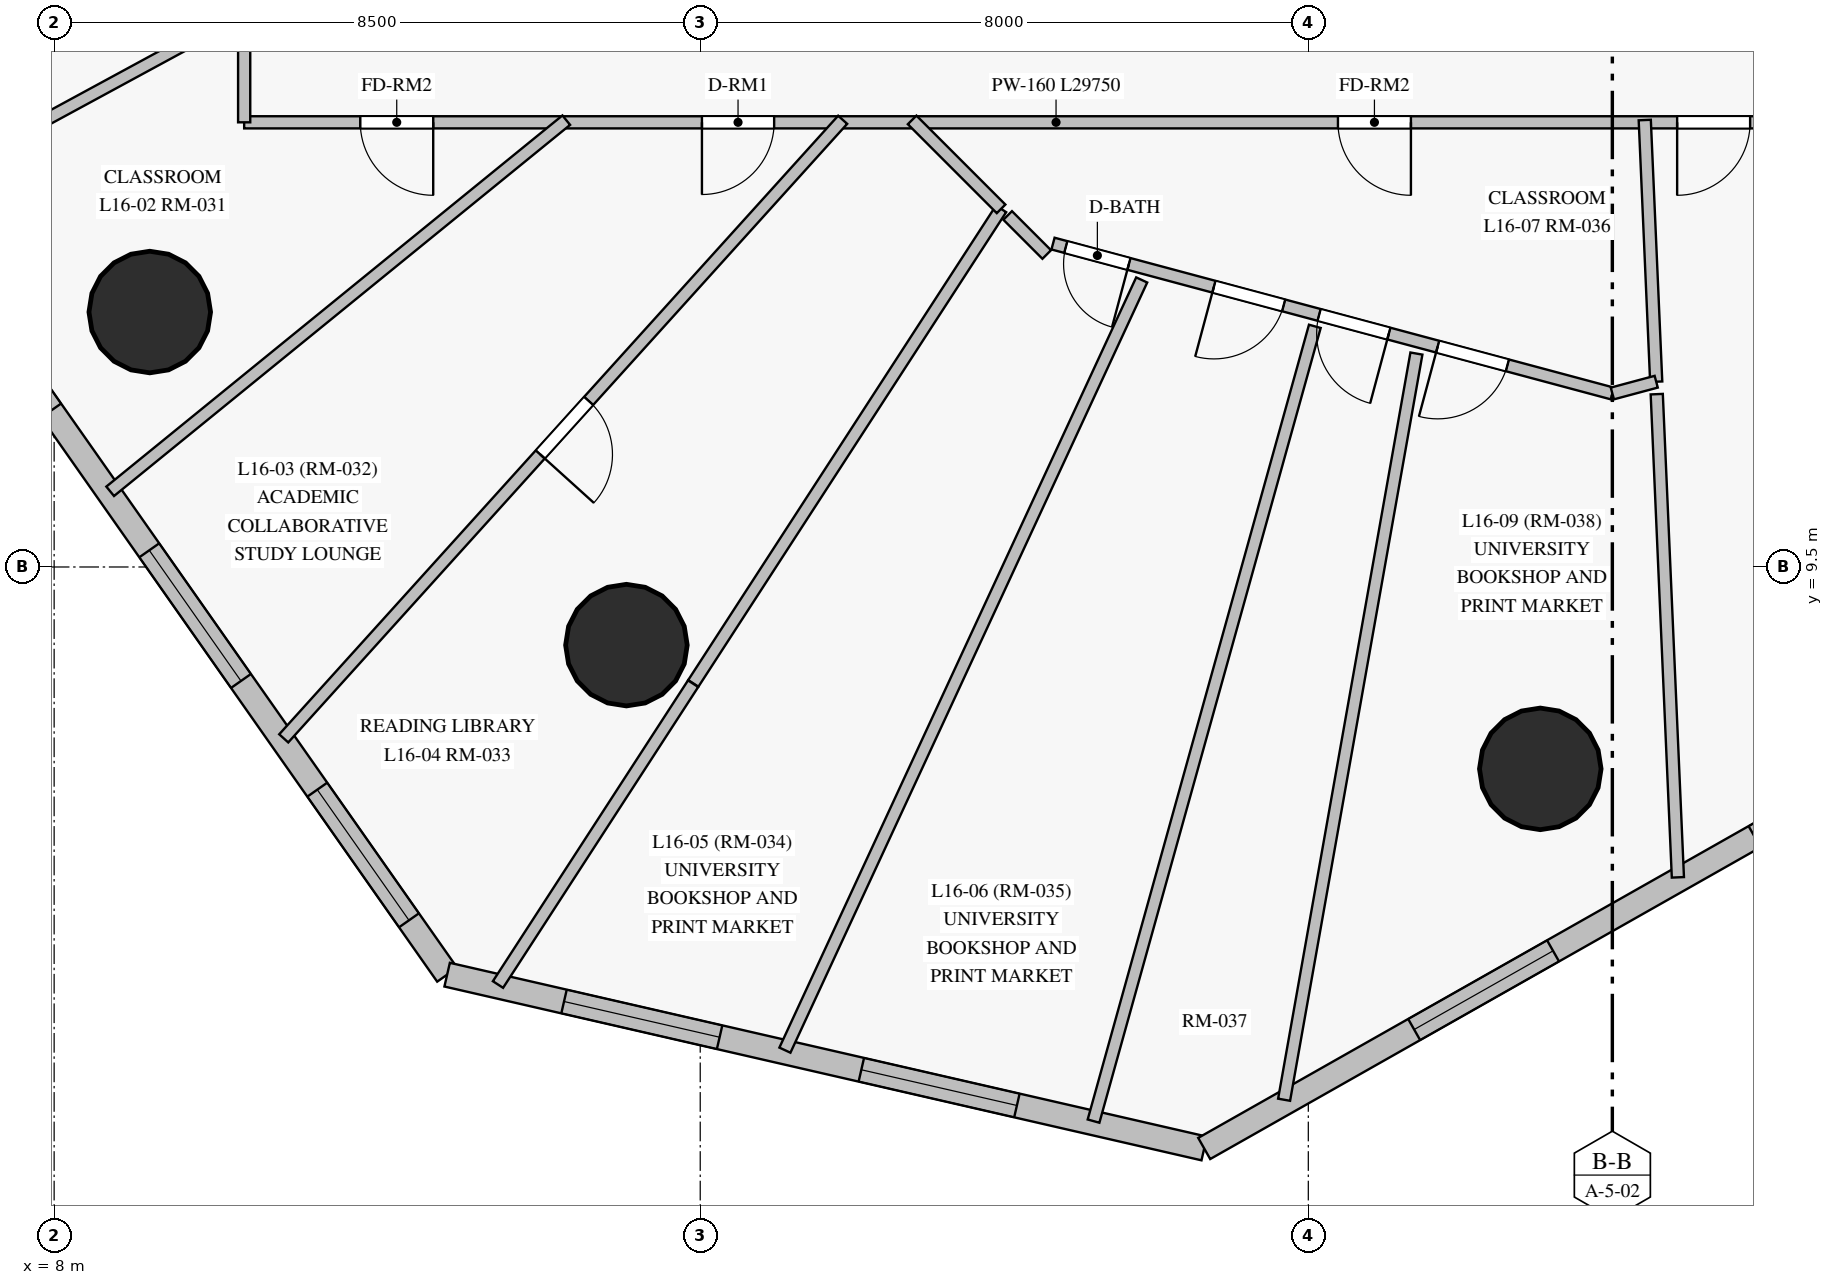
"""IFC4 building model, lengths in metres.
Left out: names, types, materials, properties, quantities, classifications, styles, units other than length and angle.
Written with IfcOpenShell. Run it as: python <this file> out.ifc"""

import sys

from ifc_helpers import new_model, si_unit, direction, frame, frame_2d, origin, origin_with_axes, origin_2d, place, context, subcontext, project, spatial, rectangle, circle, extrude, source, transform, mapped, element, fill, save


model = new_model("IFC4")
c1 = context("Model", 3, precision=1e-05, world=origin(), true_north=direction((0.0, 1.0)))
c2 = subcontext(c1, "Body", "Model", "MODEL_VIEW")
j1 = project(units=[si_unit("LENGTHUNIT", "METRE"), si_unit("PLANEANGLEUNIT", "RADIAN")], contexts=[c1])
p1 = place(None, origin())
s1 = spatial("IfcSite", under=j1, at=p1, CompositionType="ELEMENT")
p2 = place(p1, origin())
s2 = spatial("IfcBuilding", under=s1, at=p2, CompositionType="ELEMENT")
p3 = place(p2, frame((0.0, 0.0, 62.5)))
s3 = spatial("IfcBuildingStorey", under=s2, at=p3, CompositionType="ELEMENT", Elevation=62.5)
m1 = source(origin_with_axes(), c2, "Body", "SweptSolid", [
    extrude(circle(Radius=0.8, at=origin_2d()), origin(), (0.0, 0.0, 1.0), 3.6),
])
for number, where, z_axis, x_axis in (
    (1, (9.258, 12.854, 0.0), (0.0, 0.0, 1.0), (1.0, 0.0, 0.0)),
    (2, (15.529, 8.472, 0.0), (0.0, 0.0, 1.0), (1.0, 0.0, 0.0)),
    (3, (27.552, 6.844, 0.0), (0.0, 0.0, 1.0), (1.0, 0.0, 0.0)),
):
    element("IfcColumn", number, at=place(p3, frame(where, z_axis=z_axis, x_axis=x_axis)), inside=s3, PredefinedType="COLUMN", context=c2, shape_type="MappedRepresentation", body=[
        mapped(m1, transform((0.0, 0.0, 0.0), scale=1.0)),
    ])
p4 = place(p3, frame((5.857, 14.555, 0.0), z_axis=(0.0, 0.0, 1.0), x_axis=(0.574536666847, -0.818478844228, 0.0)))
e4 = element("IfcWall", 4, at=p4, inside=s3, PredefinedType="SOLIDWALL", context=c2, shape_type="SweptSolid", body=[
    extrude(rectangle(XDim=12.729, YDim=0.32, at=frame_2d((6.365, 0.0))), origin(), (0.0, 0.0, 1.0), 3.35),
])
p5 = place(p4, frame((1.562, 0.0, 0.85)))
e5 = element("IfcOpeningElement", 5, at=p5, cuts=e4, PredefinedType="OPENING", context=c2, shape_type="SweptSolid", body=[
    extrude(rectangle(XDim=2.1, YDim=1.95, at=frame_2d((1.05, 0.975))), frame((0.0, 0.17, 0.0), z_axis=(0.0, -1.0, 0.0), x_axis=(1.0, 0.0, 0.0)), (0.0, 0.0, 1.0), 0.34),
])
p6 = place(p4, frame((5.908, 0.0, 0.85)))
e6 = element("IfcOpeningElement", 6, at=p6, cuts=e4, PredefinedType="OPENING", context=c2, shape_type="SweptSolid", body=[
    extrude(rectangle(XDim=2.1, YDim=1.95, at=frame_2d((1.05, 0.975))), frame((0.0, 0.17, 0.0), z_axis=(0.0, -1.0, 0.0), x_axis=(1.0, 0.0, 0.0)), (0.0, 0.0, 1.0), 0.34),
])
p7 = place(p4, frame((9.756, 0.0, 0.85)))
e7 = element("IfcOpeningElement", 7, at=p7, cuts=e4, PredefinedType="OPENING", context=c2, shape_type="SweptSolid", body=[
    extrude(rectangle(XDim=2.1, YDim=1.95, at=frame_2d((1.05, 0.975))), frame((0.0, 0.17, 0.0), z_axis=(0.0, -1.0, 0.0), x_axis=(1.0, 0.0, 0.0)), (0.0, 0.0, 1.0), 0.34),
])
p8 = place(p3, frame((13.17, 4.137, 0.0), z_axis=(0.0, 0.0, 1.0), x_axis=(0.974645442503, -0.223754913707, 0.0)))
e8 = element("IfcWall", 8, at=p8, inside=s3, PredefinedType="SOLIDWALL", context=c2, shape_type="SweptSolid", body=[
    extrude(rectangle(XDim=10.219, YDim=0.32, at=frame_2d((5.11, 0.0))), origin(), (0.0, 0.0, 1.0), 3.35),
])
p9 = place(p8, frame((1.578, 0.0, 0.85)))
e9 = element("IfcOpeningElement", 9, at=p9, cuts=e8, PredefinedType="OPENING", context=c2, shape_type="SweptSolid", body=[
    extrude(rectangle(XDim=2.1, YDim=1.95, at=frame_2d((1.05, 0.975))), frame((0.0, 0.17, 0.0), z_axis=(0.0, -1.0, 0.0), x_axis=(1.0, 0.0, 0.0)), (0.0, 0.0, 1.0), 0.34),
])
p10 = place(p8, frame((5.591, 0.0, 0.85)))
e10 = element("IfcOpeningElement", 10, at=p10, cuts=e8, PredefinedType="OPENING", context=c2, shape_type="SweptSolid", body=[
    extrude(rectangle(XDim=2.1, YDim=1.95, at=frame_2d((1.05, 0.975))), frame((0.0, 0.17, 0.0), z_axis=(0.0, -1.0, 0.0), x_axis=(1.0, 0.0, 0.0)), (0.0, 0.0, 1.0), 0.34),
])
p11 = place(p3, frame((23.131, 1.85, 0.0), z_axis=(0.0, 0.0, 1.0), x_axis=(0.870097602534, 0.492879459974, 0.0)))
e11 = element("IfcWall", 11, at=p11, inside=s3, PredefinedType="SOLIDWALL", context=c2, shape_type="SweptSolid", body=[
    extrude(rectangle(XDim=15.318, YDim=0.32, at=frame_2d((7.659, 0.0))), origin(), (0.0, 0.0, 1.0), 3.35),
])
p12 = place(p11, frame((3.175, 0.0, 0.85)))
e12 = element("IfcOpeningElement", 12, at=p12, cuts=e11, PredefinedType="OPENING", context=c2, shape_type="SweptSolid", body=[
    extrude(rectangle(XDim=2.1, YDim=1.95, at=frame_2d((1.05, 0.975))), frame((0.0, 0.17, 0.0), z_axis=(0.0, -1.0, 0.0), x_axis=(1.0, 0.0, 0.0)), (0.0, 0.0, 1.0), 0.34),
])
p13 = place(p11, frame((8.322, 0.0, 0.85)))
e13 = element("IfcOpeningElement", 13, at=p13, cuts=e11, PredefinedType="OPENING", context=c2, shape_type="SweptSolid", body=[
    extrude(rectangle(XDim=2.1, YDim=1.95, at=frame_2d((1.05, 0.975))), frame((0.0, 0.17, 0.0), z_axis=(0.0, -1.0, 0.0), x_axis=(1.0, 0.0, 0.0)), (0.0, 0.0, 1.0), 0.34),
])
p14 = place(p11, frame((12.033, 0.0, 0.85)))
e14 = element("IfcOpeningElement", 14, at=p14, cuts=e11, PredefinedType="OPENING", context=c2, shape_type="SweptSolid", body=[
    extrude(rectangle(XDim=2.1, YDim=1.95, at=frame_2d((1.05, 0.975))), frame((0.0, 0.17, 0.0), z_axis=(0.0, -1.0, 0.0), x_axis=(1.0, 0.0, 0.0)), (0.0, 0.0, 1.0), 0.34),
])
p15 = place(p3, frame((40.25, 15.35, 0.0), z_axis=(0.0, 0.0, 1.0), x_axis=(-1.0, 0.0, 0.0)))
e15 = element("IfcWall", 15, at=p15, inside=s3, PredefinedType="PARTITIONING", context=c2, shape_type="SweptSolid", body=[
    extrude(rectangle(XDim=29.75, YDim=0.16, at=frame_2d((14.875, 0.0))), origin(), (0.0, 0.0, 1.0), 2.7),
])
p16 = place(p15, frame((27.263, 0.0, 0.0)))
e16 = element("IfcOpeningElement", 16, at=p16, cuts=e15, PredefinedType="OPENING", context=c2, shape_type="SweptSolid", body=[
    extrude(rectangle(XDim=0.96, YDim=2.15, at=frame_2d((0.48, 1.075))), frame((0.0, 0.09, 0.0), z_axis=(0.0, -1.0, 0.0), x_axis=(1.0, 0.0, 0.0)), (0.0, 0.0, 1.0), 0.18),
])
p17 = place(p15, frame((22.778, 0.0, 0.0)))
e17 = element("IfcOpeningElement", 17, at=p17, cuts=e15, PredefinedType="OPENING", context=c2, shape_type="SweptSolid", body=[
    extrude(rectangle(XDim=0.95, YDim=2.15, at=frame_2d((0.475, 1.075))), frame((0.0, 0.09, 0.0), z_axis=(0.0, -1.0, 0.0), x_axis=(1.0, 0.0, 0.0)), (0.0, 0.0, 1.0), 0.18),
])
p18 = place(p15, frame((14.4, 0.0, 0.0)))
e18 = element("IfcOpeningElement", 18, at=p18, cuts=e15, PredefinedType="OPENING", context=c2, shape_type="SweptSolid", body=[
    extrude(rectangle(XDim=0.96, YDim=2.15, at=frame_2d((0.48, 1.075))), frame((0.0, 0.09, 0.0), z_axis=(0.0, -1.0, 0.0), x_axis=(1.0, 0.0, 0.0)), (0.0, 0.0, 1.0), 0.18),
])
p19 = place(p15, frame((9.938, 0.0, 0.0)))
e19 = element("IfcOpeningElement", 19, at=p19, cuts=e15, PredefinedType="OPENING", context=c2, shape_type="SweptSolid", body=[
    extrude(rectangle(XDim=0.96, YDim=2.15, at=frame_2d((0.48, 1.075))), frame((0.0, 0.09, 0.0), z_axis=(0.0, -1.0, 0.0), x_axis=(1.0, 0.0, 0.0)), (0.0, 0.0, 1.0), 0.18),
])
p20 = place(p15, frame((2.033, 0.0, 0.0)))
e20 = element("IfcOpeningElement", 20, at=p20, cuts=e15, PredefinedType="OPENING", context=c2, shape_type="SweptSolid", body=[
    extrude(rectangle(XDim=0.95, YDim=2.15, at=frame_2d((0.475, 1.075))), frame((0.0, 0.09, 0.0), z_axis=(0.0, -1.0, 0.0), x_axis=(1.0, 0.0, 0.0)), (0.0, 0.0, 1.0), 0.18),
])
p21 = place(p3, frame((10.5, 15.35, 0.0), z_axis=(0.0, 0.0, 1.0), x_axis=(0.0, 1.0, 0.0)))
e21 = element("IfcWall", 21, at=p21, inside=s3, PredefinedType="PARTITIONING", context=c2, shape_type="SweptSolid", body=[
    extrude(rectangle(XDim=22.3, YDim=0.16, at=frame_2d((11.15, 0.0))), origin(), (0.0, 0.0, 1.0), 2.75),
])
p22 = place(p21, frame((5.1, 0.0, 0.0)))
e22 = element("IfcOpeningElement", 22, at=p22, cuts=e21, PredefinedType="OPENING", context=c2, shape_type="SweptSolid", body=[
    extrude(rectangle(XDim=0.95, YDim=2.15, at=frame_2d((0.475, 1.075))), frame((0.0, 0.09, 0.0), z_axis=(0.0, -1.0, 0.0), x_axis=(1.0, 0.0, 0.0)), (0.0, 0.0, 1.0), 0.18),
])
p23 = place(p21, frame((10.675, 0.0, 0.0)))
e23 = element("IfcOpeningElement", 23, at=p23, cuts=e21, PredefinedType="OPENING", context=c2, shape_type="SweptSolid", body=[
    extrude(rectangle(XDim=0.96, YDim=2.15, at=frame_2d((0.48, 1.075))), frame((0.0, 0.09, 0.0), z_axis=(0.0, -1.0, 0.0), x_axis=(1.0, 0.0, 0.0)), (0.0, 0.0, 1.0), 0.18),
])
p24 = place(p3, frame((22.308, 13.276, 0.0), z_axis=(0.0, 0.0, 1.0), x_axis=(-0.420324930648, -0.907373656591, 0.0)))
e24 = element("IfcWall", 24, at=p24, inside=s3, PredefinedType="PARTITIONING", context=c2, shape_type="SweptSolid", body=[
    extrude(rectangle(XDim=11.167, YDim=0.16, at=frame_2d((5.583, 0.0))), origin(), (0.0, 0.0, 1.0), 3.35),
])
p25 = place(p3, frame((18.374, 15.383, 0.0), z_axis=(0.0, 0.0, 1.0), x_axis=(-0.670442834564, -0.74196118873, 0.0)))
e25 = element("IfcWall", 25, at=p25, inside=s3, PredefinedType="PARTITIONING", context=c2, shape_type="SweptSolid", body=[
    extrude(rectangle(XDim=10.968, YDim=0.16, at=frame_2d((5.484, 0.0))), origin(), (0.0, 0.0, 1.0), 2.7),
])
p26 = place(p25, frame((4.984, 0.0, 0.0)))
e26 = element("IfcOpeningElement", 26, at=p26, cuts=e25, PredefinedType="OPENING", context=c2, shape_type="SweptSolid", body=[
    extrude(rectangle(XDim=0.95, YDim=2.15, at=frame_2d((0.475, 1.075))), frame((0.0, 0.09, 0.0), z_axis=(0.0, -1.0, 0.0), x_axis=(1.0, 0.0, 0.0)), (0.0, 0.0, 1.0), 0.18),
])
p27 = place(p3, frame((24.586, 12.666, 0.0), z_axis=(0.0, 0.0, 1.0), x_axis=(-0.268214601928, -0.963359189146, 0.0)))
e27 = element("IfcWall", 27, at=p27, inside=s3, PredefinedType="PARTITIONING", context=c2, shape_type="SweptSolid", body=[
    extrude(rectangle(XDim=10.854, YDim=0.16, at=frame_2d((5.427, 0.0))), origin(), (0.0, 0.0, 1.0), 3.35),
])
p28 = place(p3, frame((25.922, 12.308, 0.0), z_axis=(0.0, 0.0, 1.0), x_axis=(-0.174599707161, -0.984639498629, 0.0)))
e28 = element("IfcWall", 28, at=p28, inside=s3, PredefinedType="PARTITIONING", context=c2, shape_type="SweptSolid", body=[
    extrude(rectangle(XDim=9.97, YDim=0.16, at=frame_2d((4.985, 0.0))), origin(), (0.0, 0.0, 1.0), 3.35),
])
p29 = place(p3, frame((14.738, 15.378, 0.0), z_axis=(0.0, 0.0, 1.0), x_axis=(-0.775632067895, -0.631185309757, 0.0)))
e29 = element("IfcWall", 29, at=p29, inside=s3, PredefinedType="PARTITIONING", context=c2, shape_type="SweptSolid", body=[
    extrude(rectangle(XDim=7.736, YDim=0.16, at=frame_2d((3.868, 0.0))), origin(), (0.0, 0.0, 1.0), 2.7),
])
p30 = place(p3, frame((28.5, 11.783, 0.0), z_axis=(0.0, 0.0, 1.0), x_axis=(-0.965919870225, 0.258841272413, 0.0)))
e30 = element("IfcWall", 30, at=p30, inside=s3, PredefinedType="PARTITIONING", context=c2, shape_type="SweptSolid", body=[
    extrude(rectangle(XDim=7.618, YDim=0.16, at=frame_2d((3.809, 0.0))), origin(), (0.0, 0.0, 1.0), 2.75),
])
p31 = place(p30, frame((6.584, 0.0, 0.0)))
e31 = element("IfcOpeningElement", 31, at=p31, cuts=e30, PredefinedType="OPENING", context=c2, shape_type="SweptSolid", body=[
    extrude(rectangle(XDim=0.86, YDim=2.1, at=frame_2d((0.43, 1.05))), frame((0.0, 0.09, 0.0), z_axis=(0.0, -1.0, 0.0), x_axis=(1.0, 0.0, 0.0)), (0.0, 0.0, 1.0), 0.18),
])
p32 = place(p30, frame((4.477, 0.0, 0.0)))
e32 = element("IfcOpeningElement", 32, at=p32, cuts=e30, PredefinedType="OPENING", context=c2, shape_type="SweptSolid", body=[
    extrude(rectangle(XDim=0.95, YDim=2.15, at=frame_2d((0.475, 1.075))), frame((0.0, 0.09, 0.0), z_axis=(0.0, -1.0, 0.0), x_axis=(1.0, 0.0, 0.0)), (0.0, 0.0, 1.0), 0.18),
])
p33 = place(p30, frame((3.044, 0.0, 0.0)))
e33 = element("IfcOpeningElement", 33, at=p33, cuts=e30, PredefinedType="OPENING", context=c2, shape_type="SweptSolid", body=[
    extrude(rectangle(XDim=0.95, YDim=2.15, at=frame_2d((0.475, 1.075))), frame((0.0, 0.09, 0.0), z_axis=(0.0, -1.0, 0.0), x_axis=(1.0, 0.0, 0.0)), (0.0, 0.0, 1.0), 0.18),
])
p34 = place(p30, frame((1.429, 0.0, 0.0)))
e34 = element("IfcOpeningElement", 34, at=p34, cuts=e30, PredefinedType="OPENING", context=c2, shape_type="SweptSolid", body=[
    extrude(rectangle(XDim=0.95, YDim=2.15, at=frame_2d((0.475, 1.075))), frame((0.0, 0.09, 0.0), z_axis=(0.0, -1.0, 0.0), x_axis=(1.0, 0.0, 0.0)), (0.0, 0.0, 1.0), 0.18),
])
p35 = place(p3, frame((20.458, 14.212, 0.0), z_axis=(0.0, 0.0, 1.0), x_axis=(-0.544154279749, -0.838985172593, 0.0)))
e35 = element("IfcWall", 35, at=p35, inside=s3, PredefinedType="PARTITIONING", context=c2, shape_type="SweptSolid", body=[
    extrude(rectangle(XDim=7.441, YDim=0.16, at=frame_2d((3.72, 0.0))), origin(), (0.0, 0.0, 1.0), 3.35),
])
p36 = place(p3, frame((29.084, 11.774, 0.0), z_axis=(0.0, 0.0, 1.0), x_axis=(0.043703642138, -0.999044539379, 0.0)))
e36 = element("IfcWall", 36, at=p36, inside=s3, PredefinedType="PARTITIONING", context=c2, shape_type="SweptSolid", body=[
    extrude(rectangle(XDim=6.363, YDim=0.16, at=frame_2d((3.181, 0.0))), origin(), (0.0, 0.0, 1.0), 3.35),
])
p37 = place(p3, frame((10.54, 16.823, 0.0), z_axis=(0.0, 0.0, 1.0), x_axis=(-0.878958020236, -0.476899149363, 0.0)))
e37 = element("IfcWall", 37, at=p37, inside=s3, PredefinedType="PARTITIONING", context=c2, shape_type="SweptSolid", body=[
    extrude(rectangle(XDim=5.145, YDim=0.16, at=frame_2d((2.572, 0.0))), origin(), (0.0, 0.0, 1.0), 3.35),
])
p38 = place(p3, frame((16.406, 7.965, 0.0), z_axis=(0.0, 0.0, 1.0), x_axis=(-0.544145815875, -0.838990662085, 0.0)))
e38 = element("IfcWall", 38, at=p38, inside=s3, PredefinedType="PARTITIONING", context=c2, shape_type="SweptSolid", body=[
    extrude(rectangle(XDim=4.717, YDim=0.16, at=frame_2d((2.359, 0.0))), origin(), (0.0, 0.0, 1.0), 3.35),
])
p39 = place(p3, frame((28.927, 15.38, 0.0), z_axis=(0.0, 0.0, 1.0), x_axis=(0.043717029745, -0.999043953643, 0.0)))
e39 = element("IfcWall", 39, at=p39, inside=s3, PredefinedType="PARTITIONING", context=c2, shape_type="SweptSolid", body=[
    extrude(rectangle(XDim=3.446, YDim=0.16, at=frame_2d((1.723, 0.0))), origin(), (0.0, 0.0, 1.0), 3.35),
])
p40 = place(p3, frame((19.288, 15.382, 0.0), z_axis=(0.0, 0.0, 1.0), x_axis=(0.707106781187, -0.707106781187, 0.0)))
e40 = element("IfcWall", 40, at=p40, inside=s3, PredefinedType="PARTITIONING", context=c2, shape_type="SweptSolid", body=[
    extrude(rectangle(XDim=1.655, YDim=0.16, at=frame_2d((0.827, 0.0))), origin(), (0.0, 0.0, 1.0), 2.75),
])
p41 = place(p3, frame((20.545, 14.125, 0.0), z_axis=(0.0, 0.0, 1.0), x_axis=(0.707106781187, -0.707106781187, 0.0)))
e41 = element("IfcWall", 41, at=p41, inside=s3, PredefinedType="PARTITIONING", context=c2, shape_type="SweptSolid", body=[
    extrude(rectangle(XDim=0.727, YDim=0.16, at=frame_2d((0.363, 0.0))), origin(), (0.0, 0.0, 1.0), 2.75),
])
p42 = place(p3, frame((29.077, 11.938, 0.0), z_axis=(0.0, 0.0, 1.0), x_axis=(-0.96586777343, -0.259035604211, 0.0)))
e42 = element("IfcWall", 42, at=p42, inside=s3, PredefinedType="PARTITIONING", context=c2, shape_type="SweptSolid", body=[
    extrude(rectangle(XDim=0.598, YDim=0.16, at=frame_2d((0.299, 0.0))), origin(), (0.0, 0.0, 1.0), 2.75),
])
m2 = source(origin_with_axes(), c2, "Body", "SweptSolid", [
    extrude(rectangle(XDim=2.1, YDim=1.95, at=frame_2d((1.05, 0.975))), frame((0.0, 0.03, 0.0), z_axis=(0.0, -1.0, 0.0), x_axis=(1.0, 0.0, 0.0)), (0.0, 0.0, 1.0), 0.06),
])
p43 = place(p5, origin())
e43 = element("IfcWindow", 43, at=p43, inside=s3, PartitioningType="SINGLE_PANEL", PredefinedType="WINDOW", context=c2, shape_type="MappedRepresentation", body=[
    mapped(m2, transform((0.0, 0.0, 0.0), scale=1.0)),
])
fill(e5, e43)
p44 = place(p6, origin())
e44 = element("IfcWindow", 44, at=p44, inside=s3, PartitioningType="SINGLE_PANEL", PredefinedType="WINDOW", context=c2, shape_type="MappedRepresentation", body=[
    mapped(m2, transform((0.0, 0.0, 0.0), scale=1.0)),
])
fill(e6, e44)
p45 = place(p7, origin())
e45 = element("IfcWindow", 45, at=p45, inside=s3, PartitioningType="SINGLE_PANEL", PredefinedType="WINDOW", context=c2, shape_type="MappedRepresentation", body=[
    mapped(m2, transform((0.0, 0.0, 0.0), scale=1.0)),
])
fill(e7, e45)
p46 = place(p9, origin())
e46 = element("IfcWindow", 46, at=p46, inside=s3, PartitioningType="SINGLE_PANEL", PredefinedType="WINDOW", context=c2, shape_type="MappedRepresentation", body=[
    mapped(m2, transform((0.0, 0.0, 0.0), scale=1.0)),
])
fill(e9, e46)
p47 = place(p10, origin())
e47 = element("IfcWindow", 47, at=p47, inside=s3, PartitioningType="SINGLE_PANEL", PredefinedType="WINDOW", context=c2, shape_type="MappedRepresentation", body=[
    mapped(m2, transform((0.0, 0.0, 0.0), scale=1.0)),
])
fill(e10, e47)
p48 = place(p12, origin())
e48 = element("IfcWindow", 48, at=p48, inside=s3, PartitioningType="SINGLE_PANEL", PredefinedType="WINDOW", context=c2, shape_type="MappedRepresentation", body=[
    mapped(m2, transform((0.0, 0.0, 0.0), scale=1.0)),
])
fill(e12, e48)
m3 = source(origin_with_axes(), c2, "Body", "SweptSolid", [
    extrude(rectangle(XDim=0.96, YDim=2.15, at=frame_2d((0.48, 1.075))), frame((0.0, 0.025, 0.0), z_axis=(0.0, -1.0, 0.0), x_axis=(1.0, 0.0, 0.0)), (0.0, 0.0, 1.0), 0.05),
])
p49 = place(p16, origin())
e49 = element("IfcDoor", 49, at=p49, inside=s3, OperationType="SINGLE_SWING_LEFT", PredefinedType="DOOR", context=c2, shape_type="MappedRepresentation", body=[
    mapped(m3, transform((0.0, 0.0, 0.0), scale=1.0)),
])
fill(e16, e49)
m4 = source(origin_with_axes(), c2, "Body", "SweptSolid", [
    extrude(rectangle(XDim=0.95, YDim=2.15, at=frame_2d((0.475, 1.075))), frame((0.0, 0.025, 0.0), z_axis=(0.0, -1.0, 0.0), x_axis=(1.0, 0.0, 0.0)), (0.0, 0.0, 1.0), 0.05),
])
p50 = place(p17, origin())
e50 = element("IfcDoor", 50, at=p50, inside=s3, OperationType="SINGLE_SWING_RIGHT", PredefinedType="DOOR", context=c2, shape_type="MappedRepresentation", body=[
    mapped(m4, transform((0.0, 0.0, 0.0), scale=1.0)),
])
fill(e17, e50)
p51 = place(p18, origin())
e51 = element("IfcDoor", 51, at=p51, inside=s3, OperationType="SINGLE_SWING_LEFT", PredefinedType="DOOR", context=c2, shape_type="MappedRepresentation", body=[
    mapped(m3, transform((0.0, 0.0, 0.0), scale=1.0)),
])
fill(e18, e51)
p52 = place(p19, origin())
e52 = element("IfcDoor", 52, at=p52, inside=s3, OperationType="SINGLE_SWING_RIGHT", PredefinedType="DOOR", context=c2, shape_type="MappedRepresentation", body=[
    mapped(m3, transform((0.0, 0.0, 0.0), scale=1.0)),
])
fill(e19, e52)
p53 = place(p26, origin())
e53 = element("IfcDoor", 53, at=p53, inside=s3, OperationType="SINGLE_SWING_RIGHT", PredefinedType="DOOR", context=c2, shape_type="MappedRepresentation", body=[
    mapped(m4, transform((0.0, 0.0, 0.0), scale=1.0)),
])
fill(e26, e53)
m5 = source(origin_with_axes(), c2, "Body", "SweptSolid", [
    extrude(rectangle(XDim=0.86, YDim=2.1, at=frame_2d((0.43, 1.05))), frame((0.0, 0.025, 0.0), z_axis=(0.0, -1.0, 0.0), x_axis=(1.0, 0.0, 0.0)), (0.0, 0.0, 1.0), 0.05),
])
p54 = place(p31, origin())
e54 = element("IfcDoor", 54, at=p54, inside=s3, OperationType="SINGLE_SWING_LEFT", PredefinedType="DOOR", context=c2, shape_type="MappedRepresentation", body=[
    mapped(m5, transform((0.0, 0.0, 0.0), scale=1.0)),
])
fill(e31, e54)
p55 = place(p32, origin())
e55 = element("IfcDoor", 55, at=p55, inside=s3, OperationType="SINGLE_SWING_RIGHT", PredefinedType="DOOR", context=c2, shape_type="MappedRepresentation", body=[
    mapped(m4, transform((0.0, 0.0, 0.0), scale=1.0)),
])
fill(e32, e55)
p56 = place(p33, origin())
e56 = element("IfcDoor", 56, at=p56, inside=s3, OperationType="SINGLE_SWING_LEFT", PredefinedType="DOOR", context=c2, shape_type="MappedRepresentation", body=[
    mapped(m4, transform((0.0, 0.0, 0.0), scale=1.0)),
])
fill(e33, e56)
p57 = place(p34, origin())
e57 = element("IfcDoor", 57, at=p57, inside=s3, OperationType="SINGLE_SWING_RIGHT", PredefinedType="DOOR", context=c2, shape_type="MappedRepresentation", body=[
    mapped(m4, transform((0.0, 0.0, 0.0), scale=1.0)),
])
fill(e34, e57)
save(model, sys.argv[1])
